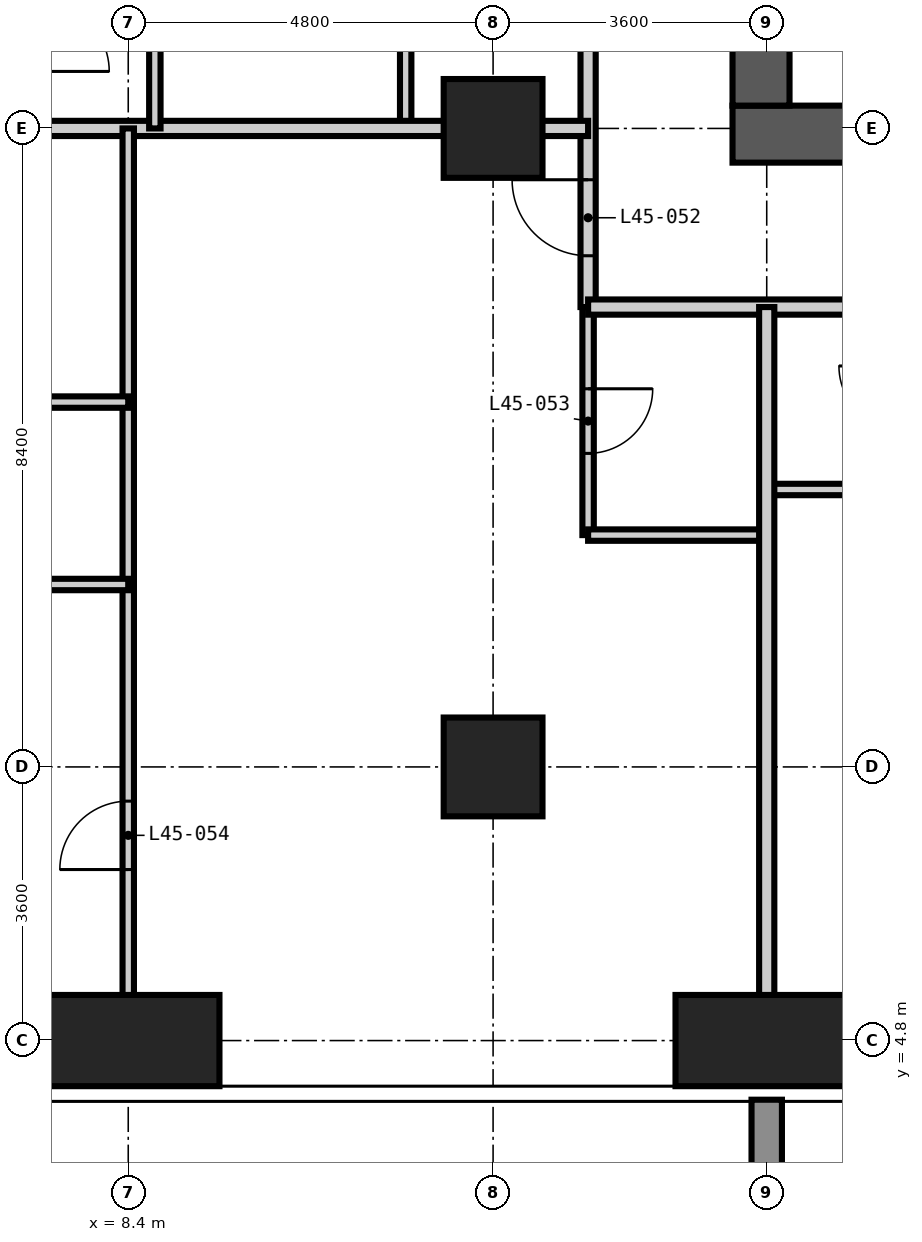
"""IFC4 building model, lengths in metres.
Left out: names, types, materials, properties, quantities, classifications, styles, units other than length and angle.
Written with IfcOpenShell. Run it as: python <this file> out.ifc"""

import sys

from ifc_helpers import new_model, si_unit, direction, frame, frame_2d, origin, origin_2d, place, context, subcontext, project, spatial, rectangle, extrude, element, fill, save


model = new_model("IFC4")
c1 = context("Model", 3, precision=1e-05, world=origin(), true_north=direction((0.0, 1.0)))
c2 = subcontext(c1, "Body", "Model", "MODEL_VIEW")
j1 = project(units=[si_unit("LENGTHUNIT", "METRE"), si_unit("PLANEANGLEUNIT", "RADIAN")], contexts=[c1])
p1 = place(None, origin())
s1 = spatial("IfcSite", under=j1, at=p1, CompositionType="ELEMENT")
p2 = place(p1, origin())
s2 = spatial("IfcBuilding", under=s1, at=p2, CompositionType="ELEMENT")
p3 = place(p2, frame((0.0, 0.0, 177.0)))
s3 = spatial("IfcBuildingStorey", under=s2, at=p3, CompositionType="ELEMENT", Elevation=177.0)
p4 = place(p3, frame((8.4, 4.8, -0.35), z_axis=(0.0, 0.0, 1.0), x_axis=(1.0, 0.0, 0.0)))
e1 = element("IfcColumn", 1, at=p4, inside=s3, PredefinedType="COLUMN", context=c2, shape_type="SweptSolid", body=[
    extrude(rectangle(XDim=2.4, YDim=1.2, at=origin_2d()), origin(), (0.0, 0.0, 1.0), 3.6),
])
for number, where, z_axis, x_axis in (
    (2, (13.2, 8.4, -0.35), (0.0, 0.0, 1.0), (1.0, 0.0, 0.0)),
    (3, (13.2, 16.8, -0.35), (0.0, 0.0, 1.0), (1.0, 0.0, 0.0)),
):
    element("IfcColumn", number, at=place(p3, frame(where, z_axis=z_axis, x_axis=x_axis)), inside=s3, PredefinedType="COLUMN", context=c2, shape_type="SweptSolid", body=[
        extrude(rectangle(XDim=1.3, YDim=1.3, at=origin_2d()), origin(), (0.0, 0.0, 1.0), 3.6),
    ])
p5 = place(p3, frame((16.8, 4.8, -0.35), z_axis=(0.0, 0.0, 1.0), x_axis=(1.0, 0.0, 0.0)))
e4 = element("IfcColumn", 4, at=p5, inside=s3, PredefinedType="COLUMN", context=c2, shape_type="SweptSolid", body=[
    extrude(rectangle(XDim=2.4, YDim=1.2, at=origin_2d()), origin(), (0.0, 0.0, 1.0), 3.6),
])
p6 = place(p3, frame((16.35, 16.725, -0.35), z_axis=(0.0, 0.0, 1.0), x_axis=(1.0, 0.0, 0.0)))
e5 = element("IfcWall", 5, at=p6, inside=s3, PredefinedType="SHEAR", context=c2, shape_type="SweptSolid", body=[
    extrude(rectangle(XDim=26.1, YDim=0.75, at=frame_2d((13.05, 0.0))), origin(), (0.0, 0.0, 1.0), 3.6),
])
p7 = place(p6, frame((12.55, 0.0, 0.35)))
e6 = element("IfcOpeningElement", 6, at=p7, cuts=e5, PredefinedType="OPENING", context=c2, shape_type="SweptSolid", body=[
    extrude(rectangle(XDim=1.0, YDim=2.1, at=frame_2d((0.5, 1.05))), frame((0.0, 0.385, 0.0), z_axis=(0.0, -1.0, 0.0), x_axis=(1.0, 0.0, 0.0)), (0.0, 0.0, 1.0), 0.77),
])
p8 = place(p6, frame((18.85, 0.0, 0.35)))
e7 = element("IfcOpeningElement", 7, at=p8, cuts=e5, PredefinedType="OPENING", context=c2, shape_type="SweptSolid", body=[
    extrude(rectangle(XDim=1.0, YDim=2.1, at=frame_2d((0.5, 1.05))), frame((0.0, 0.385, 0.0), z_axis=(0.0, -1.0, 0.0), x_axis=(1.0, 0.0, 0.0)), (0.0, 0.0, 1.0), 0.77),
])
p9 = place(p3, frame((16.725, 41.7, -0.35), z_axis=(0.0, 0.0, 1.0), x_axis=(0.0, -1.0, 0.0)))
e8 = element("IfcWall", 8, at=p9, inside=s3, PredefinedType="SHEAR", context=c2, shape_type="SweptSolid", body=[
    extrude(rectangle(XDim=24.6, YDim=0.75, at=frame_2d((12.3, 0.0))), origin(), (0.0, 0.0, 1.0), 3.6),
])
p10 = place(p9, frame((11.4, 0.0, 0.35)))
e9 = element("IfcOpeningElement", 9, at=p10, cuts=e8, PredefinedType="OPENING", context=c2, shape_type="SweptSolid", body=[
    extrude(rectangle(XDim=1.8, YDim=2.2, at=frame_2d((0.9, 1.1))), frame((0.0, 0.385, 0.0), z_axis=(0.0, -1.0, 0.0), x_axis=(1.0, 0.0, 0.0)), (0.0, 0.0, 1.0), 0.77),
])
p11 = place(p9, frame((20.2, 0.0, 0.35)))
e10 = element("IfcOpeningElement", 10, at=p11, cuts=e8, PredefinedType="OPENING", context=c2, shape_type="SweptSolid", body=[
    extrude(rectangle(XDim=1.0, YDim=2.1, at=frame_2d((0.5, 1.05))), frame((0.0, 0.385, 0.0), z_axis=(0.0, -1.0, 0.0), x_axis=(1.0, 0.0, 0.0)), (0.0, 0.0, 1.0), 0.77),
])
p12 = place(p9, frame((5.5, 0.0, 0.35)))
e11 = element("IfcOpeningElement", 11, at=p12, cuts=e8, PredefinedType="OPENING", context=c2, shape_type="SweptSolid", body=[
    extrude(rectangle(XDim=1.0, YDim=2.1, at=frame_2d((0.5, 1.05))), frame((0.0, 0.385, 0.0), z_axis=(0.0, -1.0, 0.0), x_axis=(1.0, 0.0, 0.0)), (0.0, 0.0, 1.0), 0.77),
])
p13 = place(p3, frame((12.05, 16.8, 0.0), z_axis=(0.0, 0.0, 1.0), x_axis=(0.0, 1.0, 0.0)))
e12 = element("IfcWall", 12, at=p13, inside=s3, PredefinedType="PARTITIONING", context=c2, shape_type="SweptSolid", body=[
    extrude(rectangle(XDim=2.4, YDim=0.15, at=frame_2d((1.2, 0.0))), origin(), (0.0, 0.0, 1.0), 3.25),
])
p14 = place(p3, frame((14.45, 11.45, 0.0), z_axis=(0.0, 0.0, 1.0), x_axis=(0.0, 1.0, 0.0)))
e13 = element("IfcWall", 13, at=p14, inside=s3, PredefinedType="PARTITIONING", context=c2, shape_type="SweptSolid", body=[
    extrude(rectangle(XDim=3.0, YDim=0.15, at=frame_2d((1.5, 0.0))), origin(), (0.0, 0.0, 1.0), 3.25),
])
p15 = place(p14, frame((1.075, 0.0, 0.0)))
e14 = element("IfcOpeningElement", 14, at=p15, cuts=e13, PredefinedType="OPENING", context=c2, shape_type="SweptSolid", body=[
    extrude(rectangle(XDim=0.85, YDim=2.1, at=frame_2d((0.425, 1.05))), frame((0.0, 0.085, 0.0), z_axis=(0.0, -1.0, 0.0), x_axis=(1.0, 0.0, 0.0)), (0.0, 0.0, 1.0), 0.17),
])
p16 = place(p3, frame((14.45, 11.45, 0.0), z_axis=(0.0, 0.0, 1.0), x_axis=(1.0, 0.0, 0.0)))
e15 = element("IfcWall", 15, at=p16, inside=s3, PredefinedType="PARTITIONING", context=c2, shape_type="SweptSolid", body=[
    extrude(rectangle(XDim=2.35, YDim=0.15, at=frame_2d((1.175, 0.0))), origin(), (0.0, 0.0, 1.0), 3.25),
])
p17 = place(p3, frame((16.8, 12.05, 0.0), z_axis=(0.0, 0.0, 1.0), x_axis=(1.0, 0.0, 0.0)))
e16 = element("IfcWall", 16, at=p17, inside=s3, PredefinedType="PARTITIONING", context=c2, shape_type="SweptSolid", body=[
    extrude(rectangle(XDim=1.8, YDim=0.15, at=frame_2d((0.9, 0.0))), origin(), (0.0, 0.0, 1.0), 3.25),
])
p18 = place(p3, frame((14.45, 14.45, 0.0), z_axis=(0.0, 0.0, 1.0), x_axis=(0.0, 1.0, 0.0)))
e17 = element("IfcWall", 17, at=p18, inside=s3, PredefinedType="PARTITIONING", context=c2, shape_type="SweptSolid", body=[
    extrude(rectangle(XDim=31.1, YDim=0.2, at=frame_2d((15.55, 0.0))), origin(), (0.0, 0.0, 1.0), 3.25),
])
p19 = place(p18, frame((6.05, 0.0, 0.0)))
e18 = element("IfcOpeningElement", 18, at=p19, cuts=e17, PredefinedType="OPENING", context=c2, shape_type="SweptSolid", body=[
    extrude(rectangle(XDim=1.0, YDim=2.2, at=frame_2d((0.5, 1.1))), frame((0.0, 0.11, 0.0), z_axis=(0.0, -1.0, 0.0), x_axis=(1.0, 0.0, 0.0)), (0.0, 0.0, 1.0), 0.22),
])
p20 = place(p18, frame((11.95, 0.0, 0.0)))
e19 = element("IfcOpeningElement", 19, at=p20, cuts=e17, PredefinedType="OPENING", context=c2, shape_type="SweptSolid", body=[
    extrude(rectangle(XDim=1.8, YDim=2.4, at=frame_2d((0.9, 1.2))), frame((0.0, 0.11, 0.0), z_axis=(0.0, -1.0, 0.0), x_axis=(1.0, 0.0, 0.0)), (0.0, 0.0, 1.0), 0.22),
])
p21 = place(p18, frame((19.575, 0.0, 0.0)))
e20 = element("IfcOpeningElement", 20, at=p21, cuts=e17, PredefinedType="OPENING", context=c2, shape_type="SweptSolid", body=[
    extrude(rectangle(XDim=1.0, YDim=2.2, at=frame_2d((0.5, 1.1))), frame((0.0, 0.11, 0.0), z_axis=(0.0, -1.0, 0.0), x_axis=(1.0, 0.0, 0.0)), (0.0, 0.0, 1.0), 0.22),
])
p22 = place(p18, frame((24.95, 0.0, 0.0)))
e21 = element("IfcOpeningElement", 21, at=p22, cuts=e17, PredefinedType="OPENING", context=c2, shape_type="SweptSolid", body=[
    extrude(rectangle(XDim=1.0, YDim=2.2, at=frame_2d((0.5, 1.1))), frame((0.0, 0.11, 0.0), z_axis=(0.0, -1.0, 0.0), x_axis=(1.0, 0.0, 0.0)), (0.0, 0.0, 1.0), 0.22),
])
p23 = place(p18, frame((0.675, 0.0, 0.0)))
e22 = element("IfcOpeningElement", 22, at=p23, cuts=e17, PredefinedType="OPENING", context=c2, shape_type="SweptSolid", body=[
    extrude(rectangle(XDim=1.0, YDim=2.2, at=frame_2d((0.5, 1.1))), frame((0.0, 0.11, 0.0), z_axis=(0.0, -1.0, 0.0), x_axis=(1.0, 0.0, 0.0)), (0.0, 0.0, 1.0), 0.22),
])
p24 = place(p18, frame((28.825, 0.0, 0.0)))
e23 = element("IfcOpeningElement", 23, at=p24, cuts=e17, PredefinedType="OPENING", context=c2, shape_type="SweptSolid", body=[
    extrude(rectangle(XDim=1.0, YDim=2.2, at=frame_2d((0.5, 1.1))), frame((0.0, 0.11, 0.0), z_axis=(0.0, -1.0, 0.0), x_axis=(1.0, 0.0, 0.0)), (0.0, 0.0, 1.0), 0.22),
])
p25 = place(p3, frame((44.95, 14.45, 0.0), z_axis=(0.0, 0.0, 1.0), x_axis=(-1.0, 0.0, 0.0)))
e24 = element("IfcWall", 24, at=p25, inside=s3, PredefinedType="PARTITIONING", context=c2, shape_type="SweptSolid", body=[
    extrude(rectangle(XDim=30.5, YDim=0.2, at=frame_2d((15.25, 0.0))), origin(), (0.0, 0.0, 1.0), 3.25),
])
p26 = place(p25, frame((24.65, 0.0, 0.0)))
e25 = element("IfcOpeningElement", 25, at=p26, cuts=e24, PredefinedType="OPENING", context=c2, shape_type="SweptSolid", body=[
    extrude(rectangle(XDim=1.0, YDim=2.2, at=frame_2d((0.5, 1.1))), frame((0.0, 0.11, 0.0), z_axis=(0.0, -1.0, 0.0), x_axis=(1.0, 0.0, 0.0)), (0.0, 0.0, 1.0), 0.22),
])
p27 = place(p25, frame((13.85, 0.0, 0.0)))
e26 = element("IfcOpeningElement", 26, at=p27, cuts=e24, PredefinedType="OPENING", context=c2, shape_type="SweptSolid", body=[
    extrude(rectangle(XDim=1.0, YDim=2.2, at=frame_2d((0.5, 1.1))), frame((0.0, 0.11, 0.0), z_axis=(0.0, -1.0, 0.0), x_axis=(1.0, 0.0, 0.0)), (0.0, 0.0, 1.0), 0.22),
])
p28 = place(p25, frame((7.85, 0.0, 0.0)))
e27 = element("IfcOpeningElement", 27, at=p28, cuts=e24, PredefinedType="OPENING", context=c2, shape_type="SweptSolid", body=[
    extrude(rectangle(XDim=1.0, YDim=2.2, at=frame_2d((0.5, 1.1))), frame((0.0, 0.11, 0.0), z_axis=(0.0, -1.0, 0.0), x_axis=(1.0, 0.0, 0.0)), (0.0, 0.0, 1.0), 0.22),
])
for number, where, z_axis, x_axis in (
    (28, (16.8, 4.182, 0.0), (0.0, 0.0, 1.0), (0.0, 1.0, 0.0)),
    (29, (4.182, 16.8, 0.0), (0.0, 0.0, 1.0), (1.0, 0.0, 0.0)),
):
    element("IfcWall", number, at=place(p3, frame(where, z_axis=z_axis, x_axis=x_axis)), inside=s3, PredefinedType="PARTITIONING", context=c2, shape_type="SweptSolid", body=[
        extrude(rectangle(XDim=10.268, YDim=0.2, at=frame_2d((5.134, 0.0))), origin(), (0.0, 0.0, 1.0), 3.25),
    ])
p29 = place(p3, frame((8.4, 4.182, 0.0), z_axis=(0.0, 0.0, 1.0), x_axis=(0.0, 1.0, 0.0)))
e30 = element("IfcWall", 30, at=p29, inside=s3, PredefinedType="PARTITIONING", context=c2, shape_type="SweptSolid", body=[
    extrude(rectangle(XDim=12.618, YDim=0.15, at=frame_2d((6.309, 0.0))), origin(), (0.0, 0.0, 1.0), 3.25),
])
p30 = place(p29, frame((2.868, 0.0, 0.0)))
e31 = element("IfcOpeningElement", 31, at=p30, cuts=e30, PredefinedType="OPENING", context=c2, shape_type="SweptSolid", body=[
    extrude(rectangle(XDim=0.9, YDim=2.1, at=frame_2d((0.45, 1.05))), frame((0.0, 0.085, 0.0), z_axis=(0.0, -1.0, 0.0), x_axis=(1.0, 0.0, 0.0)), (0.0, 0.0, 1.0), 0.17),
])
p31 = place(p3, frame((8.75, 16.8, 0.0), z_axis=(0.0, 0.0, 1.0), x_axis=(0.0, 1.0, 0.0)))
e32 = element("IfcWall", 32, at=p31, inside=s3, PredefinedType="PARTITIONING", context=c2, shape_type="SweptSolid", body=[
    extrude(rectangle(XDim=2.4, YDim=0.15, at=frame_2d((1.2, 0.0))), origin(), (0.0, 0.0, 1.0), 3.25),
])
p32 = place(p3, frame((5.4, 10.8, 0.0), z_axis=(0.0, 0.0, 1.0), x_axis=(1.0, 0.0, 0.0)))
e33 = element("IfcWall", 33, at=p32, inside=s3, PredefinedType="PARTITIONING", context=c2, shape_type="SweptSolid", body=[
    extrude(rectangle(XDim=3.0, YDim=0.15, at=frame_2d((1.5, 0.0))), origin(), (0.0, 0.0, 1.0), 3.25),
])
p33 = place(p32, frame((1.05, 0.0, 0.0)))
e34 = element("IfcOpeningElement", 34, at=p33, cuts=e33, PredefinedType="OPENING", context=c2, shape_type="SweptSolid", body=[
    extrude(rectangle(XDim=0.9, YDim=2.1, at=frame_2d((0.45, 1.05))), frame((0.0, 0.085, 0.0), z_axis=(0.0, -1.0, 0.0), x_axis=(1.0, 0.0, 0.0)), (0.0, 0.0, 1.0), 0.17),
])
p34 = place(p3, frame((5.4, 13.2, 0.0), z_axis=(0.0, 0.0, 1.0), x_axis=(1.0, 0.0, 0.0)))
e35 = element("IfcWall", 35, at=p34, inside=s3, PredefinedType="PARTITIONING", context=c2, shape_type="SweptSolid", body=[
    extrude(rectangle(XDim=3.0, YDim=0.15, at=frame_2d((1.5, 0.0))), origin(), (0.0, 0.0, 1.0), 3.25),
])
p35 = place(p23, origin())
e36 = element("IfcDoor", 36, at=p35, inside=s3, OperationType="SINGLE_SWING_RIGHT", PredefinedType="DOOR", context=c2, shape_type="SweptSolid", body=[
    extrude(rectangle(XDim=1.0, YDim=2.2, at=frame_2d((0.5, 1.1))), frame((0.0, 0.025, 0.0), z_axis=(0.0, -1.0, 0.0), x_axis=(1.0, 0.0, 0.0)), (0.0, 0.0, 1.0), 0.05),
])
fill(e22, e36)
p36 = place(p15, frame((0.85, 0.0, 0.0), z_axis=(0.0, 0.0, 1.0), x_axis=(-1.0, 0.0, 0.0)))
e37 = element("IfcDoor", 37, at=p36, inside=s3, OperationType="SINGLE_SWING_LEFT", PredefinedType="DOOR", context=c2, shape_type="SweptSolid", body=[
    extrude(rectangle(XDim=0.85, YDim=2.1, at=frame_2d((0.425, 1.05))), frame((0.0, 0.025, 0.0), z_axis=(0.0, -1.0, 0.0), x_axis=(1.0, 0.0, 0.0)), (0.0, 0.0, 1.0), 0.05),
])
fill(e14, e37)
p37 = place(p30, origin())
e38 = element("IfcDoor", 38, at=p37, inside=s3, OperationType="SINGLE_SWING_LEFT", PredefinedType="DOOR", context=c2, shape_type="SweptSolid", body=[
    extrude(rectangle(XDim=0.9, YDim=2.1, at=frame_2d((0.45, 1.05))), frame((0.0, 0.025, 0.0), z_axis=(0.0, -1.0, 0.0), x_axis=(1.0, 0.0, 0.0)), (0.0, 0.0, 1.0), 0.05),
])
fill(e31, e38)
save(model, sys.argv[1])
